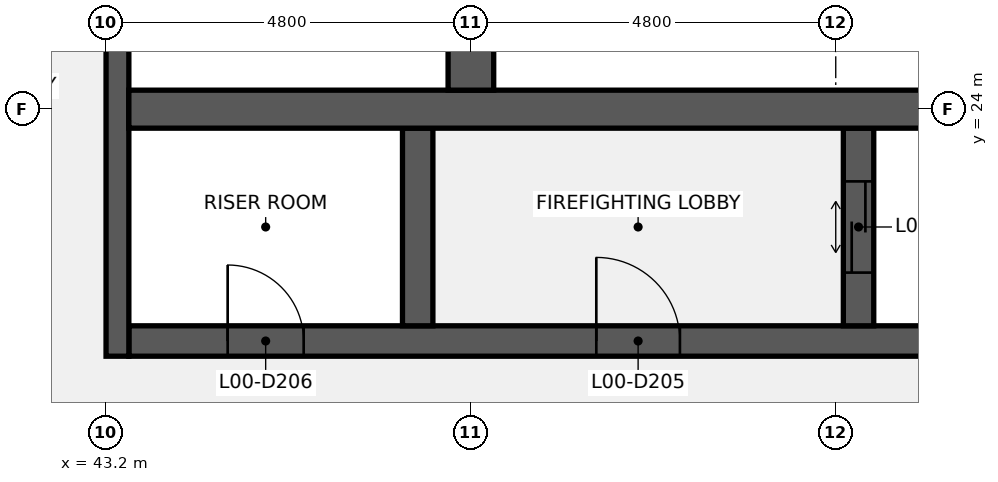
"""IFC4 building model, lengths in metres.
Left out: names, types, materials, properties, quantities, classifications, styles, units other than length and angle.
Written with IfcOpenShell. Run it as: python <this file> out.ifc"""

import sys

from ifc_helpers import new_model, si_unit, direction, frame, frame_2d, origin, place, context, subcontext, project, spatial, rectangle, extrude, element, fill, save


model = new_model("IFC4")
c1 = context("Model", 3, precision=1e-05, world=origin(), true_north=direction((0.0, 1.0)))
c2 = subcontext(c1, "Body", "Model", "MODEL_VIEW")
j1 = project(units=[si_unit("LENGTHUNIT", "METRE"), si_unit("PLANEANGLEUNIT", "RADIAN")], contexts=[c1])
p1 = place(None, origin())
s1 = spatial("IfcSite", under=j1, at=p1, CompositionType="ELEMENT")
p2 = place(p1, origin())
s2 = spatial("IfcBuilding", under=s1, at=p2, CompositionType="ELEMENT")
p3 = place(p2, origin())
s3 = spatial("IfcBuildingStorey", under=s2, at=p3, CompositionType="ELEMENT", Elevation=0.0)
p4 = place(p3, frame((43.5, 20.95, -2.0), z_axis=(0.0, 0.0, 1.0), x_axis=(1.0, 0.0, 0.0)))
e1 = element("IfcWall", 1, at=p4, inside=s3, PredefinedType="SHEAR", context=c2, shape_type="SweptSolid", body=[
    extrude(rectangle(XDim=12.9, YDim=0.4, at=frame_2d((6.45, 0.0))), origin(), (0.0, 0.0, 1.0), 14.3),
])
p5 = place(p4, frame((6.15, 0.0, 2.0)))
e2 = element("IfcOpeningElement", 2, at=p5, cuts=e1, PredefinedType="OPENING", context=c2, shape_type="SweptSolid", body=[
    extrude(rectangle(XDim=1.1, YDim=2.1, at=frame_2d((0.55, 1.05))), frame((0.0, 0.21, 0.0), z_axis=(0.0, -1.0, 0.0), x_axis=(1.0, 0.0, 0.0)), (0.0, 0.0, 1.0), 0.42),
])
p6 = place(p4, frame((1.3, 0.0, 2.0)))
e3 = element("IfcOpeningElement", 3, at=p6, cuts=e1, PredefinedType="OPENING", context=c2, shape_type="SweptSolid", body=[
    extrude(rectangle(XDim=1.0, YDim=2.1, at=frame_2d((0.5, 1.05))), frame((0.0, 0.21, 0.0), z_axis=(0.0, -1.0, 0.0), x_axis=(1.0, 0.0, 0.0)), (0.0, 0.0, 1.0), 0.42),
])
p7 = place(p3, frame((43.35, 20.75, -2.0), z_axis=(0.0, 0.0, 1.0), x_axis=(0.0, 1.0, 0.0)))
e4 = element("IfcWall", 4, at=p7, inside=s3, PredefinedType="SHEAR", context=c2, shape_type="SweptSolid", body=[
    extrude(rectangle(XDim=6.5, YDim=0.3, at=frame_2d((3.25, 0.0))), origin(), (0.0, 0.0, 1.0), 14.3),
])
p8 = place(p3, frame((53.1, 21.15, -2.0), z_axis=(0.0, 0.0, 1.0), x_axis=(0.0, 1.0, 0.0)))
e5 = element("IfcWall", 5, at=p8, inside=s3, PredefinedType="SHEAR", context=c2, shape_type="SweptSolid", body=[
    extrude(rectangle(XDim=2.6, YDim=0.4, at=frame_2d((1.3, 0.0))), origin(), (0.0, 0.0, 1.0), 14.3),
])
p9 = place(p8, frame((0.7, 0.0, 2.0)))
e6 = element("IfcOpeningElement", 6, at=p9, cuts=e5, PredefinedType="OPENING", context=c2, shape_type="SweptSolid", body=[
    extrude(rectangle(XDim=1.2, YDim=2.1, at=frame_2d((0.6, 1.05))), frame((0.0, 0.21, 0.0), z_axis=(0.0, -1.0, 0.0), x_axis=(1.0, 0.0, 0.0)), (0.0, 0.0, 1.0), 0.42),
])
p10 = place(p3, frame((47.3, 21.15, -2.0), z_axis=(0.0, 0.0, 1.0), x_axis=(0.0, 1.0, 0.0)))
e7 = element("IfcWall", 7, at=p10, inside=s3, PredefinedType="SHEAR", context=c2, shape_type="SweptSolid", body=[
    extrude(rectangle(XDim=2.6, YDim=0.4, at=frame_2d((1.3, 0.0))), origin(), (0.0, 0.0, 1.0), 14.3),
])
p11 = place(p3, frame((43.5, 24.0, -2.0), z_axis=(0.0, 0.0, 1.0), x_axis=(1.0, 0.0, 0.0)))
e8 = element("IfcWall", 8, at=p11, inside=s3, PredefinedType="SHEAR", context=c2, shape_type="SweptSolid", body=[
    extrude(rectangle(XDim=12.9, YDim=0.5, at=frame_2d((6.45, 0.0))), origin(), (0.0, 0.0, 1.0), 14.3),
])
p12 = place(p3, frame((48.0, 24.25, -2.0), z_axis=(0.0, 0.0, 1.0), x_axis=(0.0, 1.0, 0.0)))
e9 = element("IfcWall", 9, at=p12, inside=s3, PredefinedType="SHEAR", context=c2, shape_type="SweptSolid", body=[
    extrude(rectangle(XDim=2.6, YDim=0.6, at=frame_2d((1.3, 0.0))), origin(), (0.0, 0.0, 1.0), 14.3),
])
p13 = place(p5, origin())
e10 = element("IfcDoor", 10, at=p13, inside=s3, OperationType="SINGLE_SWING_LEFT", PredefinedType="DOOR", context=c2, shape_type="SweptSolid", body=[
    extrude(rectangle(XDim=1.1, YDim=2.1, at=frame_2d((0.55, 1.05))), frame((0.0, 0.025, 0.0), z_axis=(0.0, -1.0, 0.0), x_axis=(1.0, 0.0, 0.0)), (0.0, 0.0, 1.0), 0.05),
])
fill(e2, e10)
p14 = place(p6, origin())
e11 = element("IfcDoor", 11, at=p14, inside=s3, OperationType="SINGLE_SWING_LEFT", PredefinedType="DOOR", context=c2, shape_type="SweptSolid", body=[
    extrude(rectangle(XDim=1.0, YDim=2.1, at=frame_2d((0.5, 1.05))), frame((0.0, 0.025, 0.0), z_axis=(0.0, -1.0, 0.0), x_axis=(1.0, 0.0, 0.0)), (0.0, 0.0, 1.0), 0.05),
])
fill(e3, e11)
p15 = place(p9, origin())
e12 = element("IfcDoor", 12, at=p15, inside=s3, OperationType="DOUBLE_DOOR_SLIDING", PredefinedType="DOOR", context=c2, shape_type="SweptSolid", body=[
    extrude(rectangle(XDim=1.2, YDim=2.1, at=frame_2d((0.6, 1.05))), frame((0.0, 0.025, 0.0), z_axis=(0.0, -1.0, 0.0), x_axis=(1.0, 0.0, 0.0)), (0.0, 0.0, 1.0), 0.05),
])
fill(e6, e12)
save(model, sys.argv[1])
